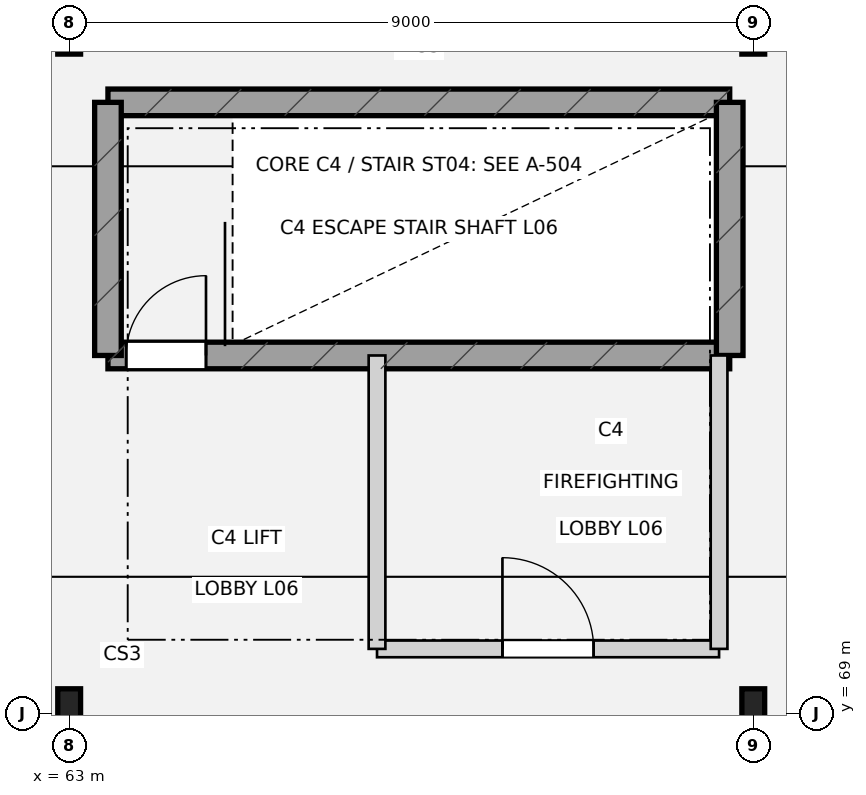
"""IFC4 building model, lengths in metres.
Left out: names, types, materials, properties, quantities, classifications, styles, units other than length and angle.
Written with IfcOpenShell. Run it as: python <this file> out.ifc"""

import sys

from ifc_helpers import new_model, si_unit, direction, frame, frame_2d, origin, origin_2d, place, context, subcontext, project, spatial, rectangle, i_section, extrude, element, fill, save


model = new_model("IFC4")
c1 = context("Model", 3, precision=1e-05, world=origin(), true_north=direction((0.0, 1.0)))
c2 = subcontext(c1, "Body", "Model", "MODEL_VIEW")
j1 = project(units=[si_unit("LENGTHUNIT", "METRE"), si_unit("PLANEANGLEUNIT", "RADIAN")], contexts=[c1])
p1 = place(None, origin())
s1 = spatial("IfcSite", under=j1, at=p1, CompositionType="ELEMENT")
p2 = place(p1, origin())
s2 = spatial("IfcBuilding", under=s1, at=p2, CompositionType="ELEMENT")
p3 = place(p2, frame((0.0, 0.0, 30.6)))
s3 = spatial("IfcBuildingStorey", under=s2, at=p3, CompositionType="ELEMENT", Elevation=30.6)
for number, where, z_axis, x_axis in (
    (1, (63.0, 69.0, 0.0), (0.0, 0.0, 1.0), (1.0, 0.0, 0.0)),
    (2, (63.0, 78.0, 0.0), (0.0, 0.0, 1.0), (1.0, 0.0, 0.0)),
    (3, (72.0, 69.0, 0.0), (0.0, 0.0, 1.0), (1.0, 0.0, 0.0)),
    (4, (72.0, 78.0, 0.0), (0.0, 0.0, 1.0), (1.0, 0.0, 0.0)),
):
    element("IfcColumn", number, at=place(p3, frame(where, z_axis=z_axis, x_axis=x_axis)), inside=s3, PredefinedType="COLUMN", context=c2, shape_type="SweptSolid", body=[
        extrude(i_section(OverallWidth=0.3, OverallDepth=0.65, WebThickness=0.016, FlangeThickness=0.031, at=origin_2d()), origin(), (0.0, 0.0, 1.0), 4.2),
    ])
p4 = place(p3, frame((63.51, 73.71, 0.0), z_axis=(0.0, 0.0, 1.0), x_axis=(1.0, 0.0, 0.0)))
e5 = element("IfcWall", 5, at=p4, inside=s3, PredefinedType="SHEAR", context=c2, shape_type="SweptSolid", body=[
    extrude(rectangle(XDim=8.18, YDim=0.35, at=frame_2d((4.09, 0.0))), origin(), (0.0, 0.0, 1.0), 3.8),
])
p5 = place(p4, frame((0.24, 0.0, 0.0)))
e6 = element("IfcOpeningElement", 6, at=p5, cuts=e5, PredefinedType="OPENING", context=c2, shape_type="SweptSolid", body=[
    extrude(rectangle(XDim=1.05, YDim=2.18, at=frame_2d((0.525, 1.09))), frame((0.0, 0.185, 0.0), z_axis=(0.0, -1.0, 0.0), x_axis=(1.0, 0.0, 0.0)), (0.0, 0.0, 1.0), 0.37),
])
p6 = place(p3, frame((63.51, 77.04, 0.0), z_axis=(0.0, 0.0, 1.0), x_axis=(1.0, 0.0, 0.0)))
e7 = element("IfcWall", 7, at=p6, inside=s3, PredefinedType="SHEAR", context=c2, shape_type="SweptSolid", body=[
    extrude(rectangle(XDim=8.18, YDim=0.35, at=frame_2d((4.09, 0.0))), origin(), (0.0, 0.0, 1.0), 3.8),
])
for number, where, z_axis, x_axis in (
    (8, (63.51, 73.71, 0.0), (0.0, 0.0, 1.0), (0.0, 1.0, 0.0)),
    (9, (71.69, 73.71, 0.0), (0.0, 0.0, 1.0), (0.0, 1.0, 0.0)),
):
    element("IfcWall", number, at=place(p3, frame(where, z_axis=z_axis, x_axis=x_axis)), inside=s3, PredefinedType="SHEAR", context=c2, shape_type="SweptSolid", body=[
        extrude(rectangle(XDim=3.33, YDim=0.35, at=frame_2d((1.665, 0.0))), origin(), (0.0, 0.0, 1.0), 3.8),
    ])
p7 = place(p3, frame((67.05, 69.85, 0.0), z_axis=(0.0, 0.0, 1.0), x_axis=(1.0, 0.0, 0.0)))
e10 = element("IfcWall", 10, at=p7, inside=s3, PredefinedType="PARTITIONING", context=c2, shape_type="SweptSolid", body=[
    extrude(rectangle(XDim=4.5, YDim=0.22, at=frame_2d((2.25, 0.0))), origin(), (0.0, 0.0, 1.0), 3.435),
])
p8 = place(p7, frame((1.65, 0.0, 0.0)))
e11 = element("IfcOpeningElement", 11, at=p8, cuts=e10, PredefinedType="OPENING", context=c2, shape_type="SweptSolid", body=[
    extrude(rectangle(XDim=1.2, YDim=2.18, at=frame_2d((0.6, 1.09))), frame((0.0, 0.12, 0.0), z_axis=(0.0, -1.0, 0.0), x_axis=(1.0, 0.0, 0.0)), (0.0, 0.0, 1.0), 0.24),
])
for number, where, z_axis, x_axis in (
    (12, (67.05, 69.85, 0.0), (0.0, 0.0, 1.0), (0.0, 1.0, 0.0)),
    (13, (71.55, 69.85, 0.0), (0.0, 0.0, 1.0), (0.0, 1.0, 0.0)),
):
    element("IfcWall", number, at=place(p3, frame(where, z_axis=z_axis, x_axis=x_axis)), inside=s3, PredefinedType="PARTITIONING", context=c2, shape_type="SweptSolid", body=[
        extrude(rectangle(XDim=3.86, YDim=0.22, at=frame_2d((1.93, 0.0))), origin(), (0.0, 0.0, 1.0), 2.755),
    ])
p9 = place(p5, origin())
e14 = element("IfcDoor", 14, at=p9, inside=s3, OperationType="SINGLE_SWING_RIGHT", PredefinedType="DOOR", context=c2, shape_type="SweptSolid", body=[
    extrude(rectangle(XDim=1.05, YDim=2.18, at=frame_2d((0.525, 1.09))), frame((0.0, 0.025, 0.0), z_axis=(0.0, -1.0, 0.0), x_axis=(1.0, 0.0, 0.0)), (0.0, 0.0, 1.0), 0.05),
])
fill(e6, e14)
p10 = place(p8, origin())
e15 = element("IfcDoor", 15, at=p10, inside=s3, OperationType="SINGLE_SWING_LEFT", PredefinedType="DOOR", context=c2, shape_type="SweptSolid", body=[
    extrude(rectangle(XDim=1.2, YDim=2.18, at=frame_2d((0.6, 1.09))), frame((0.0, 0.025, 0.0), z_axis=(0.0, -1.0, 0.0), x_axis=(1.0, 0.0, 0.0)), (0.0, 0.0, 1.0), 0.05),
])
fill(e11, e15)
save(model, sys.argv[1])
